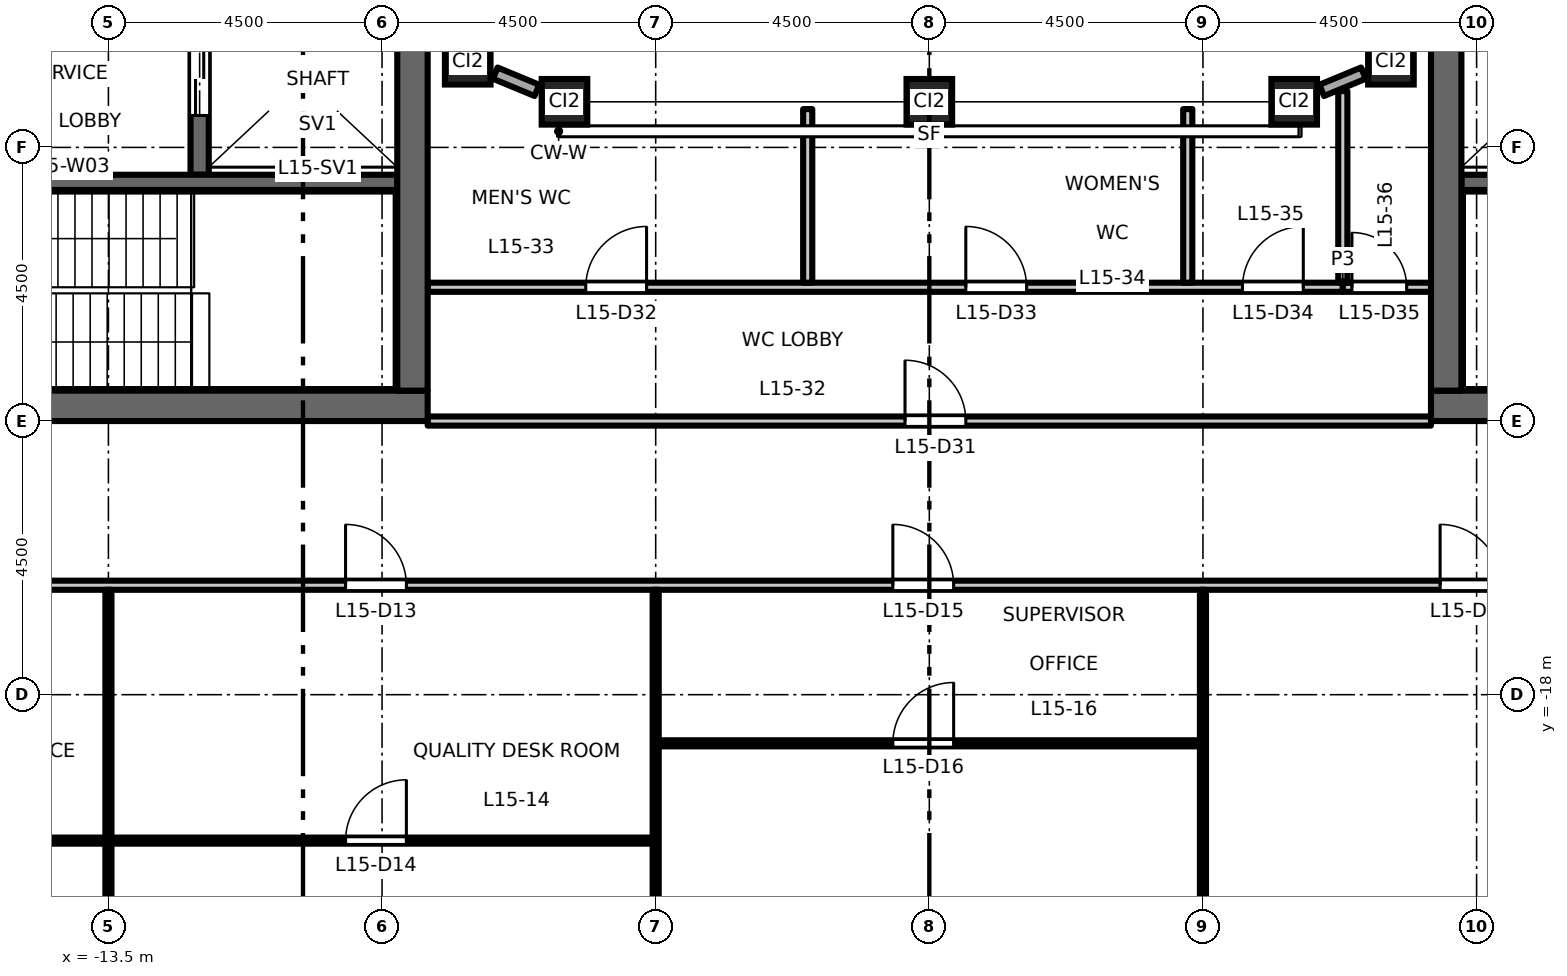
"""IFC4 building model, lengths in metres.
Left out: names, types, materials, properties, quantities, classifications, styles, units other than length and angle.
Written with IfcOpenShell. Run it as: python <this file> out.ifc"""

import sys

from ifc_helpers import new_model, si_unit, direction, frame, frame_2d, origin, origin_2d, place, context, subcontext, project, spatial, rectangle, hollow_rectangle, extrude, element, fill, save


model = new_model("IFC4")
c1 = context("Model", 3, precision=1e-05, world=origin(), true_north=direction((0.0, 1.0)))
c2 = subcontext(c1, "Body", "Model", "MODEL_VIEW")
j1 = project(units=[si_unit("LENGTHUNIT", "METRE"), si_unit("PLANEANGLEUNIT", "RADIAN")], contexts=[c1])
p1 = place(None, origin())
s1 = spatial("IfcSite", under=j1, at=p1, CompositionType="ELEMENT")
p2 = place(p1, origin())
s2 = spatial("IfcBuilding", under=s1, at=p2, CompositionType="ELEMENT")
p3 = place(p2, frame((0.0, 0.0, 71.7)))
s3 = spatial("IfcBuildingStorey", under=s2, at=p3, CompositionType="ELEMENT", Elevation=71.7)
for number, where, z_axis, x_axis in (
    (1, (-7.591, -7.591, 0.0), (0.0, 0.0, 1.0), (1.0, 0.0, 0.0)),
    (2, (-6.0, -8.25, 0.0), (0.0, 0.0, 1.0), (1.0, 0.0, 0.0)),
    (3, (0.0, -8.25, 0.0), (0.0, 0.0, 1.0), (1.0, 0.0, 0.0)),
    (4, (6.0, -8.25, 0.0), (0.0, 0.0, 1.0), (1.0, 0.0, 0.0)),
    (5, (7.591, -7.591, 0.0), (0.0, 0.0, 1.0), (1.0, 0.0, 0.0)),
):
    element("IfcColumn", number, at=place(p3, frame(where, z_axis=z_axis, x_axis=x_axis)), inside=s3, PredefinedType="COLUMN", context=c2, shape_type="SweptSolid", body=[
        extrude(hollow_rectangle(XDim=0.75, YDim=0.75, WallThickness=0.045, at=origin_2d()), origin(), (0.0, 0.0, 1.0), 4.5),
    ])
p4 = place(p3, frame((-12.0, -9.45, 0.0), z_axis=(0.0, 0.0, 1.0), x_axis=(0.0, 1.0, 0.0)))
e6 = element("IfcWall", 6, at=p4, inside=s3, PredefinedType="SHEAR", context=c2, shape_type="SweptSolid", body=[
    extrude(rectangle(XDim=18.9, YDim=0.3, at=frame_2d((9.45, 0.0))), origin(), (0.0, 0.0, 1.0), 4.35),
])
p5 = place(p4, frame((3.625, 0.0, 0.0)))
e7 = element("IfcOpeningElement", 7, at=p5, cuts=e6, PredefinedType="OPENING", context=c2, shape_type="SweptSolid", body=[
    extrude(rectangle(XDim=1.1, YDim=2.1, at=frame_2d((0.55, 1.05))), frame((0.0, 0.16, 0.0), z_axis=(0.0, -1.0, 0.0), x_axis=(1.0, 0.0, 0.0)), (0.0, 0.0, 1.0), 0.32),
])
p6 = place(p4, frame((6.775, 0.0, 0.0)))
e8 = element("IfcOpeningElement", 8, at=p6, cuts=e6, PredefinedType="OPENING", context=c2, shape_type="SweptSolid", body=[
    extrude(rectangle(XDim=1.1, YDim=2.1, at=frame_2d((0.55, 1.05))), frame((0.0, 0.16, 0.0), z_axis=(0.0, -1.0, 0.0), x_axis=(1.0, 0.0, 0.0)), (0.0, 0.0, 1.0), 0.32),
])
p7 = place(p4, frame((9.925, 0.0, 0.0)))
e9 = element("IfcOpeningElement", 9, at=p7, cuts=e6, PredefinedType="OPENING", context=c2, shape_type="SweptSolid", body=[
    extrude(rectangle(XDim=1.1, YDim=2.1, at=frame_2d((0.55, 1.05))), frame((0.0, 0.16, 0.0), z_axis=(0.0, -1.0, 0.0), x_axis=(1.0, 0.0, 0.0)), (0.0, 0.0, 1.0), 0.32),
])
p8 = place(p4, frame((13.075, 0.0, 0.0)))
e10 = element("IfcOpeningElement", 10, at=p8, cuts=e6, PredefinedType="OPENING", context=c2, shape_type="SweptSolid", body=[
    extrude(rectangle(XDim=1.1, YDim=2.1, at=frame_2d((0.55, 1.05))), frame((0.0, 0.16, 0.0), z_axis=(0.0, -1.0, 0.0), x_axis=(1.0, 0.0, 0.0)), (0.0, 0.0, 1.0), 0.32),
])
p9 = place(p4, frame((16.725, 0.0, 0.0)))
e11 = element("IfcOpeningElement", 11, at=p9, cuts=e6, PredefinedType="OPENING", context=c2, shape_type="SweptSolid", body=[
    extrude(rectangle(XDim=1.2, YDim=2.1, at=frame_2d((0.6, 1.05))), frame((0.0, 0.16, 0.0), z_axis=(0.0, -1.0, 0.0), x_axis=(1.0, 0.0, 0.0)), (0.0, 0.0, 1.0), 0.32),
])
p10 = place(p4, frame((0.975, 0.0, 0.0)))
e12 = element("IfcOpeningElement", 12, at=p10, cuts=e6, PredefinedType="OPENING", context=c2, shape_type="SweptSolid", body=[
    extrude(rectangle(XDim=1.2, YDim=2.1, at=frame_2d((0.6, 1.05))), frame((0.0, 0.16, 0.0), z_axis=(0.0, -1.0, 0.0), x_axis=(1.0, 0.0, 0.0)), (0.0, 0.0, 1.0), 0.32),
])
p11 = place(p3, frame((-8.75, -9.575, 0.0), z_axis=(0.0, 0.0, 1.0), x_axis=(-1.0, 0.0, 0.0)))
e13 = element("IfcWall", 13, at=p11, inside=s3, PredefinedType="SHEAR", context=c2, shape_type="SweptSolid", body=[
    extrude(rectangle(XDim=8.0, YDim=0.25, at=frame_2d((4.0, 0.0))), origin(), (0.0, 0.0, 1.0), 4.35),
])
p12 = place(p11, frame((6.65, 0.0, 0.0)))
e14 = element("IfcOpeningElement", 14, at=p12, cuts=e13, PredefinedType="OPENING", context=c2, shape_type="SweptSolid", body=[
    extrude(rectangle(XDim=1.1, YDim=2.1, at=frame_2d((0.55, 1.05))), frame((0.0, 0.135, 0.0), z_axis=(0.0, -1.0, 0.0), x_axis=(1.0, 0.0, 0.0)), (0.0, 0.0, 1.0), 0.27),
])
p13 = place(p3, frame((-8.25, -13.25, 0.0), z_axis=(0.0, 0.0, 1.0), x_axis=(-1.0, 0.0, 0.0)))
e15 = element("IfcWall", 15, at=p13, inside=s3, PredefinedType="SHEAR", context=c2, shape_type="SweptSolid", body=[
    extrude(rectangle(XDim=13.5, YDim=0.5, at=frame_2d((6.75, 0.0))), origin(), (0.0, 0.0, 1.0), 4.35),
])
p14 = place(p3, frame((-8.5, -13.0, 0.0), z_axis=(0.0, 0.0, 1.0), x_axis=(0.0, 1.0, 0.0)))
e16 = element("IfcWall", 16, at=p14, inside=s3, PredefinedType="SHEAR", context=c2, shape_type="SweptSolid", body=[
    extrude(rectangle(XDim=26.0, YDim=0.5, at=frame_2d((13.0, 0.0))), origin(), (0.0, 0.0, 1.0), 4.35),
])
p15 = place(p3, frame((8.75, -9.575, 0.0), z_axis=(0.0, 0.0, 1.0), x_axis=(1.0, 0.0, 0.0)))
e17 = element("IfcWall", 17, at=p15, inside=s3, PredefinedType="SHEAR", context=c2, shape_type="SweptSolid", body=[
    extrude(rectangle(XDim=8.0, YDim=0.25, at=frame_2d((4.0, 0.0))), origin(), (0.0, 0.0, 1.0), 4.35),
])
p16 = place(p15, frame((6.65, 0.0, 0.0)))
e18 = element("IfcOpeningElement", 18, at=p16, cuts=e17, PredefinedType="OPENING", context=c2, shape_type="SweptSolid", body=[
    extrude(rectangle(XDim=1.1, YDim=2.1, at=frame_2d((0.55, 1.05))), frame((0.0, 0.135, 0.0), z_axis=(0.0, -1.0, 0.0), x_axis=(1.0, 0.0, 0.0)), (0.0, 0.0, 1.0), 0.27),
])
p17 = place(p3, frame((8.25, -13.25, 0.0), z_axis=(0.0, 0.0, 1.0), x_axis=(1.0, 0.0, 0.0)))
e19 = element("IfcWall", 19, at=p17, inside=s3, PredefinedType="SHEAR", context=c2, shape_type="SweptSolid", body=[
    extrude(rectangle(XDim=13.5, YDim=0.5, at=frame_2d((6.75, 0.0))), origin(), (0.0, 0.0, 1.0), 4.35),
])
p18 = place(p3, frame((8.5, -13.0, 0.0), z_axis=(0.0, 0.0, 1.0), x_axis=(0.0, 1.0, 0.0)))
e20 = element("IfcWall", 20, at=p18, inside=s3, PredefinedType="SHEAR", context=c2, shape_type="SweptSolid", body=[
    extrude(rectangle(XDim=26.0, YDim=0.5, at=frame_2d((13.0, 0.0))), origin(), (0.0, 0.0, 1.0), 4.35),
])
for number, where, z_axis, x_axis in (
    (21, (6.453, -8.062, 0.0), (0.0, 0.0, 1.0), (0.924, 0.383, 0.0)),
    (22, (-7.138, -7.779, 0.0), (0.0, 0.0, 1.0), (0.924, -0.383, 0.0)),
):
    element("IfcWall", number, at=place(p3, frame(where, z_axis=z_axis, x_axis=x_axis)), inside=s3, PredefinedType="STANDARD", context=c2, shape_type="SweptSolid", body=[
        extrude(rectangle(XDim=0.742, YDim=0.2, at=frame_2d((0.371, 0.0))), origin(), (0.0, 0.0, 1.0), 3.73),
    ])
p19 = place(p3, frame((-22.45, -20.4, 0.0), z_axis=(0.0, 0.0, 1.0), x_axis=(1.0, 0.0, 0.0)))
e23 = element("IfcWall", 23, at=p19, inside=s3, PredefinedType="PARTITIONING", context=c2, shape_type="SweptSolid", body=[
    extrude(rectangle(XDim=17.9, YDim=0.1, at=frame_2d((8.95, 0.0))), origin(), (0.0, 0.0, 1.0), 4.35),
])
p20 = place(p19, frame((3.85, 0.0, 0.0)))
e24 = element("IfcOpeningElement", 24, at=p20, cuts=e23, PredefinedType="OPENING", context=c2, shape_type="SweptSolid", body=[
    extrude(rectangle(XDim=1.0, YDim=2.1, at=frame_2d((0.5, 1.05))), frame((0.0, 0.06, 0.0), z_axis=(0.0, -1.0, 0.0), x_axis=(1.0, 0.0, 0.0)), (0.0, 0.0, 1.0), 0.12),
])
p21 = place(p19, frame((12.85, 0.0, 0.0)))
e25 = element("IfcOpeningElement", 25, at=p21, cuts=e23, PredefinedType="OPENING", context=c2, shape_type="SweptSolid", body=[
    extrude(rectangle(XDim=1.0, YDim=2.1, at=frame_2d((0.5, 1.05))), frame((0.0, 0.06, 0.0), z_axis=(0.0, -1.0, 0.0), x_axis=(1.0, 0.0, 0.0)), (0.0, 0.0, 1.0), 0.12),
])
p22 = place(p3, frame((-4.45, -18.8, 0.0), z_axis=(0.0, 0.0, 1.0), x_axis=(1.0, 0.0, 0.0)))
e26 = element("IfcWall", 26, at=p22, inside=s3, PredefinedType="PARTITIONING", context=c2, shape_type="SweptSolid", body=[
    extrude(rectangle(XDim=8.9, YDim=0.1, at=frame_2d((4.45, 0.0))), origin(), (0.0, 0.0, 1.0), 4.35),
])
p23 = place(p22, frame((3.85, 0.0, 0.0)))
e27 = element("IfcOpeningElement", 27, at=p23, cuts=e26, PredefinedType="OPENING", context=c2, shape_type="SweptSolid", body=[
    extrude(rectangle(XDim=1.0, YDim=2.1, at=frame_2d((0.5, 1.05))), frame((0.0, 0.06, 0.0), z_axis=(0.0, -1.0, 0.0), x_axis=(1.0, 0.0, 0.0)), (0.0, 0.0, 1.0), 0.12),
])
p24 = place(p3, frame((-30.51, -16.2, 0.0), z_axis=(0.0, 0.0, 1.0), x_axis=(1.0, 0.0, 0.0)))
e28 = element("IfcWall", 28, at=p24, inside=s3, PredefinedType="PARTITIONING", context=c2, shape_type="SweptSolid", body=[
    extrude(rectangle(XDim=61.02, YDim=0.15, at=frame_2d((30.51, 0.0))), origin(), (0.0, 0.0, 1.0), 4.35),
])
p25 = place(p24, frame((11.91, 0.0, 0.0)))
e29 = element("IfcOpeningElement", 29, at=p25, cuts=e28, PredefinedType="OPENING", context=c2, shape_type="SweptSolid", body=[
    extrude(rectangle(XDim=1.0, YDim=2.1, at=frame_2d((0.5, 1.05))), frame((0.0, 0.085, 0.0), z_axis=(0.0, -1.0, 0.0), x_axis=(1.0, 0.0, 0.0)), (0.0, 0.0, 1.0), 0.17),
])
p26 = place(p24, frame((20.91, 0.0, 0.0)))
e30 = element("IfcOpeningElement", 30, at=p26, cuts=e28, PredefinedType="OPENING", context=c2, shape_type="SweptSolid", body=[
    extrude(rectangle(XDim=1.0, YDim=2.1, at=frame_2d((0.5, 1.05))), frame((0.0, 0.085, 0.0), z_axis=(0.0, -1.0, 0.0), x_axis=(1.0, 0.0, 0.0)), (0.0, 0.0, 1.0), 0.17),
])
p27 = place(p24, frame((29.91, 0.0, 0.0)))
e31 = element("IfcOpeningElement", 31, at=p27, cuts=e28, PredefinedType="OPENING", context=c2, shape_type="SweptSolid", body=[
    extrude(rectangle(XDim=1.0, YDim=2.1, at=frame_2d((0.5, 1.05))), frame((0.0, 0.085, 0.0), z_axis=(0.0, -1.0, 0.0), x_axis=(1.0, 0.0, 0.0)), (0.0, 0.0, 1.0), 0.17),
])
p28 = place(p24, frame((38.91, 0.0, 0.0)))
e32 = element("IfcOpeningElement", 32, at=p28, cuts=e28, PredefinedType="OPENING", context=c2, shape_type="SweptSolid", body=[
    extrude(rectangle(XDim=1.0, YDim=2.1, at=frame_2d((0.5, 1.05))), frame((0.0, 0.085, 0.0), z_axis=(0.0, -1.0, 0.0), x_axis=(1.0, 0.0, 0.0)), (0.0, 0.0, 1.0), 0.17),
])
p29 = place(p24, frame((47.91, 0.0, 0.0)))
e33 = element("IfcOpeningElement", 33, at=p29, cuts=e28, PredefinedType="OPENING", context=c2, shape_type="SweptSolid", body=[
    extrude(rectangle(XDim=1.0, YDim=2.1, at=frame_2d((0.5, 1.05))), frame((0.0, 0.085, 0.0), z_axis=(0.0, -1.0, 0.0), x_axis=(1.0, 0.0, 0.0)), (0.0, 0.0, 1.0), 0.17),
])
p30 = place(p24, frame((3.4, 0.0, 0.0)))
e34 = element("IfcOpeningElement", 34, at=p30, cuts=e28, PredefinedType="OPENING", context=c2, shape_type="SweptSolid", body=[
    extrude(rectangle(XDim=1.0, YDim=2.1, at=frame_2d((0.5, 1.05))), frame((0.0, 0.085, 0.0), z_axis=(0.0, -1.0, 0.0), x_axis=(1.0, 0.0, 0.0)), (0.0, 0.0, 1.0), 0.17),
])
p31 = place(p24, frame((56.41, 0.0, 0.0)))
e35 = element("IfcOpeningElement", 35, at=p31, cuts=e28, PredefinedType="OPENING", context=c2, shape_type="SweptSolid", body=[
    extrude(rectangle(XDim=1.0, YDim=2.1, at=frame_2d((0.5, 1.05))), frame((0.0, 0.085, 0.0), z_axis=(0.0, -1.0, 0.0), x_axis=(1.0, 0.0, 0.0)), (0.0, 0.0, 1.0), 0.17),
])
p32 = place(p3, frame((-8.25, -13.5, 0.0), z_axis=(0.0, 0.0, 1.0), x_axis=(1.0, 0.0, 0.0)))
e36 = element("IfcWall", 36, at=p32, inside=s3, PredefinedType="PARTITIONING", context=c2, shape_type="SweptSolid", body=[
    extrude(rectangle(XDim=16.5, YDim=0.15, at=frame_2d((8.25, 0.0))), origin(), (0.0, 0.0, 1.0), 3.85),
])
p33 = place(p32, frame((7.85, 0.0, 0.0)))
e37 = element("IfcOpeningElement", 37, at=p33, cuts=e36, PredefinedType="OPENING", context=c2, shape_type="SweptSolid", body=[
    extrude(rectangle(XDim=1.0, YDim=2.1, at=frame_2d((0.5, 1.05))), frame((0.0, 0.085, 0.0), z_axis=(0.0, -1.0, 0.0), x_axis=(1.0, 0.0, 0.0)), (0.0, 0.0, 1.0), 0.17),
])
p34 = place(p3, frame((-8.25, -11.3, 0.0), z_axis=(0.0, 0.0, 1.0), x_axis=(1.0, 0.0, 0.0)))
e38 = element("IfcWall", 38, at=p34, inside=s3, PredefinedType="PARTITIONING", context=c2, shape_type="SweptSolid", body=[
    extrude(rectangle(XDim=15.05, YDim=0.15, at=frame_2d((7.525, 0.0))), origin(), (0.0, 0.0, 1.0), 4.35),
])
p35 = place(p34, frame((2.6, 0.0, 0.0)))
e39 = element("IfcOpeningElement", 39, at=p35, cuts=e38, PredefinedType="OPENING", context=c2, shape_type="SweptSolid", body=[
    extrude(rectangle(XDim=1.0, YDim=2.1, at=frame_2d((0.5, 1.05))), frame((0.0, 0.085, 0.0), z_axis=(0.0, -1.0, 0.0), x_axis=(1.0, 0.0, 0.0)), (0.0, 0.0, 1.0), 0.17),
])
p36 = place(p34, frame((8.85, 0.0, 0.0)))
e40 = element("IfcOpeningElement", 40, at=p36, cuts=e38, PredefinedType="OPENING", context=c2, shape_type="SweptSolid", body=[
    extrude(rectangle(XDim=1.0, YDim=2.1, at=frame_2d((0.5, 1.05))), frame((0.0, 0.085, 0.0), z_axis=(0.0, -1.0, 0.0), x_axis=(1.0, 0.0, 0.0)), (0.0, 0.0, 1.0), 0.17),
])
p37 = place(p34, frame((13.4, 0.0, 0.0)))
e41 = element("IfcOpeningElement", 41, at=p37, cuts=e38, PredefinedType="OPENING", context=c2, shape_type="SweptSolid", body=[
    extrude(rectangle(XDim=1.0, YDim=2.1, at=frame_2d((0.5, 1.05))), frame((0.0, 0.085, 0.0), z_axis=(0.0, -1.0, 0.0), x_axis=(1.0, 0.0, 0.0)), (0.0, 0.0, 1.0), 0.17),
])
p38 = place(p3, frame((6.8, -11.3, 0.0), z_axis=(0.0, 0.0, 1.0), x_axis=(1.0, 0.0, 0.0)))
e42 = element("IfcWall", 42, at=p38, inside=s3, PredefinedType="PARTITIONING", context=c2, shape_type="SweptSolid", body=[
    extrude(rectangle(XDim=1.45, YDim=0.15, at=frame_2d((0.725, 0.0))), origin(), (0.0, 0.0, 1.0), 4.35),
])
p39 = place(p38, frame((0.15, 0.0, 0.0)))
e43 = element("IfcOpeningElement", 43, at=p39, cuts=e42, PredefinedType="OPENING", context=c2, shape_type="SweptSolid", body=[
    extrude(rectangle(XDim=0.9, YDim=2.1, at=frame_2d((0.45, 1.05))), frame((0.0, 0.085, 0.0), z_axis=(0.0, -1.0, 0.0), x_axis=(1.0, 0.0, 0.0)), (0.0, 0.0, 1.0), 0.17),
])
p40 = place(p3, frame((-13.5, -30.51, 0.0), z_axis=(0.0, 0.0, 1.0), x_axis=(0.0, 1.0, 0.0)))
e44 = element("IfcWall", 44, at=p40, inside=s3, PredefinedType="PARTITIONING", context=c2, shape_type="SweptSolid", body=[
    extrude(rectangle(XDim=10.06, YDim=0.1, at=frame_2d((5.03, 0.0))), origin(), (0.0, 0.0, 1.0), 3.35),
])
p41 = place(p3, frame((-13.5, -20.35, 0.0), z_axis=(0.0, 0.0, 1.0), x_axis=(0.0, 1.0, 0.0)))
e45 = element("IfcWall", 45, at=p41, inside=s3, PredefinedType="PARTITIONING", context=c2, shape_type="SweptSolid", body=[
    extrude(rectangle(XDim=4.075, YDim=0.1, at=frame_2d((2.038, 0.0))), origin(), (0.0, 0.0, 1.0), 3.35),
])
p42 = place(p3, frame((-4.5, -30.51, 0.0), z_axis=(0.0, 0.0, 1.0), x_axis=(0.0, 1.0, 0.0)))
e46 = element("IfcWall", 46, at=p42, inside=s3, PredefinedType="PARTITIONING", context=c2, shape_type="SweptSolid", body=[
    extrude(rectangle(XDim=14.235, YDim=0.1, at=frame_2d((7.118, 0.0))), origin(), (0.0, 0.0, 1.0), 3.35),
])
for number, where, z_axis, x_axis in (
    (47, (-2.0, -11.225, 0.0), (0.0, 0.0, 1.0), (0.0, 1.0, 0.0)),
    (48, (4.25, -11.225, 0.0), (0.0, 0.0, 1.0), (0.0, 1.0, 0.0)),
):
    element("IfcWall", number, at=place(p3, frame(where, z_axis=z_axis, x_axis=x_axis)), inside=s3, PredefinedType="PARTITIONING", context=c2, shape_type="SweptSolid", body=[
        extrude(rectangle(XDim=2.855, YDim=0.15, at=frame_2d((1.427, 0.0))), origin(), (0.0, 0.0, 1.0), 4.35),
    ])
p43 = place(p3, frame((4.5, -30.51, 0.0), z_axis=(0.0, 0.0, 1.0), x_axis=(0.0, 1.0, 0.0)))
e49 = element("IfcWall", 49, at=p43, inside=s3, PredefinedType="PARTITIONING", context=c2, shape_type="SweptSolid", body=[
    extrude(rectangle(XDim=14.235, YDim=0.1, at=frame_2d((7.118, 0.0))), origin(), (0.0, 0.0, 1.0), 3.35),
])
p44 = place(p3, frame((6.8, -11.225, 0.0), z_axis=(0.0, 0.0, 1.0), x_axis=(0.0, 1.0, 0.0)))
e50 = element("IfcWall", 50, at=p44, inside=s3, PredefinedType="PARTITIONING", context=c2, shape_type="SweptSolid", body=[
    extrude(rectangle(XDim=3.151, YDim=0.15, at=frame_2d((1.576, 0.0))), origin(), (0.0, 0.0, 1.0), 4.35),
])
p45 = place(p10, origin())
e51 = element("IfcDoor", 51, at=p45, inside=s3, OperationType="DOUBLE_DOOR_SLIDING", PredefinedType="DOOR", context=c2, shape_type="SweptSolid", body=[
    extrude(rectangle(XDim=1.2, YDim=2.1, at=frame_2d((0.6, 1.05))), frame((0.0, 0.025, 0.0), z_axis=(0.0, -1.0, 0.0), x_axis=(1.0, 0.0, 0.0)), (0.0, 0.0, 1.0), 0.05),
])
fill(e12, e51)
p46 = place(p26, origin())
e52 = element("IfcDoor", 52, at=p46, inside=s3, OperationType="SINGLE_SWING_LEFT", PredefinedType="DOOR", context=c2, shape_type="SweptSolid", body=[
    extrude(rectangle(XDim=1.0, YDim=2.1, at=frame_2d((0.5, 1.05))), frame((0.0, 0.025, 0.0), z_axis=(0.0, -1.0, 0.0), x_axis=(1.0, 0.0, 0.0)), (0.0, 0.0, 1.0), 0.05),
])
fill(e30, e52)
p47 = place(p21, origin())
e53 = element("IfcDoor", 53, at=p47, inside=s3, OperationType="SINGLE_SWING_RIGHT", PredefinedType="DOOR", context=c2, shape_type="SweptSolid", body=[
    extrude(rectangle(XDim=1.0, YDim=2.1, at=frame_2d((0.5, 1.05))), frame((0.0, 0.025, 0.0), z_axis=(0.0, -1.0, 0.0), x_axis=(1.0, 0.0, 0.0)), (0.0, 0.0, 1.0), 0.05),
])
fill(e25, e53)
p48 = place(p27, origin())
e54 = element("IfcDoor", 54, at=p48, inside=s3, OperationType="SINGLE_SWING_LEFT", PredefinedType="DOOR", context=c2, shape_type="SweptSolid", body=[
    extrude(rectangle(XDim=1.0, YDim=2.1, at=frame_2d((0.5, 1.05))), frame((0.0, 0.025, 0.0), z_axis=(0.0, -1.0, 0.0), x_axis=(1.0, 0.0, 0.0)), (0.0, 0.0, 1.0), 0.05),
])
fill(e31, e54)
p49 = place(p23, origin())
e55 = element("IfcDoor", 55, at=p49, inside=s3, OperationType="SINGLE_SWING_RIGHT", PredefinedType="DOOR", context=c2, shape_type="SweptSolid", body=[
    extrude(rectangle(XDim=1.0, YDim=2.1, at=frame_2d((0.5, 1.05))), frame((0.0, 0.025, 0.0), z_axis=(0.0, -1.0, 0.0), x_axis=(1.0, 0.0, 0.0)), (0.0, 0.0, 1.0), 0.05),
])
fill(e27, e55)
p50 = place(p28, origin())
e56 = element("IfcDoor", 56, at=p50, inside=s3, OperationType="SINGLE_SWING_LEFT", PredefinedType="DOOR", context=c2, shape_type="SweptSolid", body=[
    extrude(rectangle(XDim=1.0, YDim=2.1, at=frame_2d((0.5, 1.05))), frame((0.0, 0.025, 0.0), z_axis=(0.0, -1.0, 0.0), x_axis=(1.0, 0.0, 0.0)), (0.0, 0.0, 1.0), 0.05),
])
fill(e32, e56)
p51 = place(p33, origin())
e57 = element("IfcDoor", 57, at=p51, inside=s3, OperationType="SINGLE_SWING_LEFT", PredefinedType="DOOR", context=c2, shape_type="SweptSolid", body=[
    extrude(rectangle(XDim=1.0, YDim=2.1, at=frame_2d((0.5, 1.05))), frame((0.0, 0.025, 0.0), z_axis=(0.0, -1.0, 0.0), x_axis=(1.0, 0.0, 0.0)), (0.0, 0.0, 1.0), 0.05),
])
fill(e37, e57)
p52 = place(p35, origin())
e58 = element("IfcDoor", 58, at=p52, inside=s3, OperationType="SINGLE_SWING_RIGHT", PredefinedType="DOOR", context=c2, shape_type="SweptSolid", body=[
    extrude(rectangle(XDim=1.0, YDim=2.1, at=frame_2d((0.5, 1.05))), frame((0.0, 0.025, 0.0), z_axis=(0.0, -1.0, 0.0), x_axis=(1.0, 0.0, 0.0)), (0.0, 0.0, 1.0), 0.05),
])
fill(e39, e58)
p53 = place(p36, origin())
e59 = element("IfcDoor", 59, at=p53, inside=s3, OperationType="SINGLE_SWING_LEFT", PredefinedType="DOOR", context=c2, shape_type="SweptSolid", body=[
    extrude(rectangle(XDim=1.0, YDim=2.1, at=frame_2d((0.5, 1.05))), frame((0.0, 0.025, 0.0), z_axis=(0.0, -1.0, 0.0), x_axis=(1.0, 0.0, 0.0)), (0.0, 0.0, 1.0), 0.05),
])
fill(e40, e59)
p54 = place(p37, origin())
e60 = element("IfcDoor", 60, at=p54, inside=s3, OperationType="SINGLE_SWING_RIGHT", PredefinedType="DOOR", context=c2, shape_type="SweptSolid", body=[
    extrude(rectangle(XDim=1.0, YDim=2.1, at=frame_2d((0.5, 1.05))), frame((0.0, 0.025, 0.0), z_axis=(0.0, -1.0, 0.0), x_axis=(1.0, 0.0, 0.0)), (0.0, 0.0, 1.0), 0.05),
])
fill(e41, e60)
p55 = place(p39, origin())
e61 = element("IfcDoor", 61, at=p55, inside=s3, OperationType="SINGLE_SWING_LEFT", PredefinedType="DOOR", context=c2, shape_type="SweptSolid", body=[
    extrude(rectangle(XDim=0.9, YDim=2.1, at=frame_2d((0.45, 1.05))), frame((0.0, 0.025, 0.0), z_axis=(0.0, -1.0, 0.0), x_axis=(1.0, 0.0, 0.0)), (0.0, 0.0, 1.0), 0.05),
])
fill(e43, e61)
save(model, sys.argv[1])
